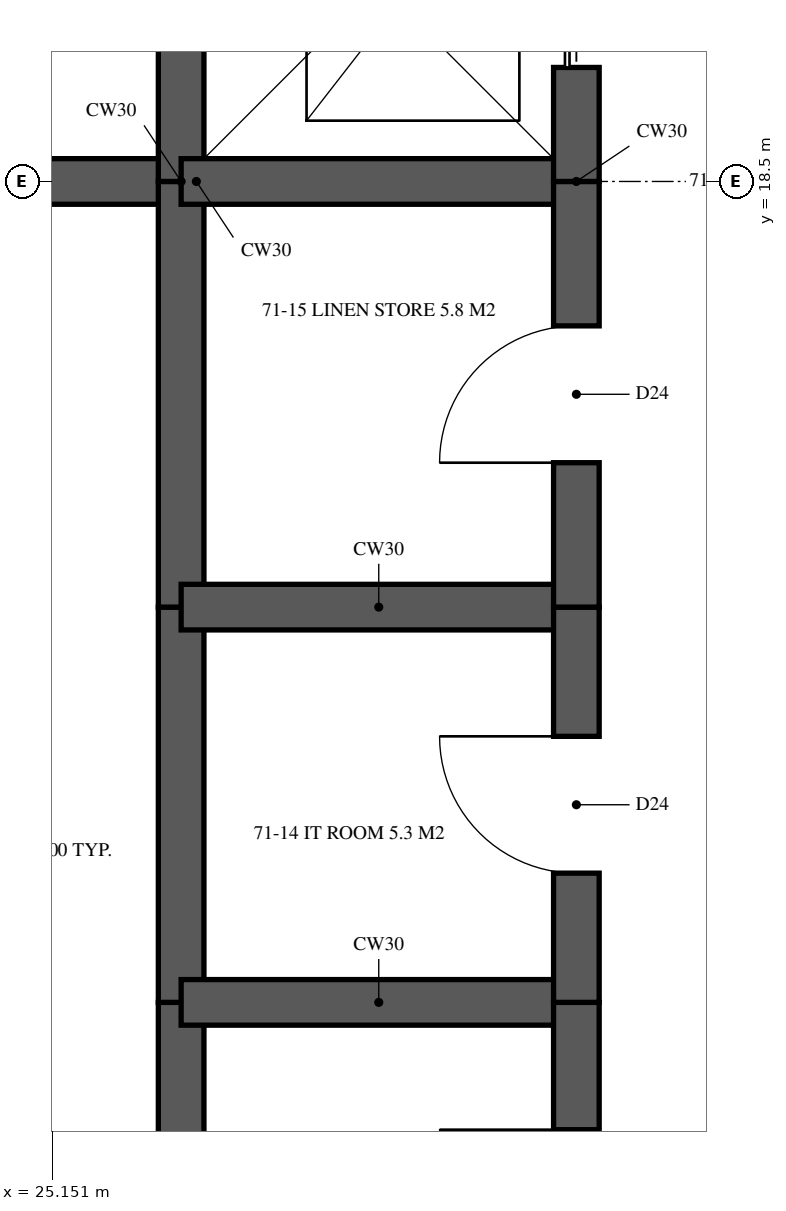
"""IFC4 building model, lengths in metres.
Left out: names, types, materials, properties, quantities, classifications, styles, units other than length and angle.
Written with IfcOpenShell. Run it as: python <this file> out.ifc"""

import sys

from ifc_helpers import new_model, si_unit, direction, frame, frame_2d, origin, place, context, subcontext, project, spatial, rectangle, extrude, element, fill, save


model = new_model("IFC4")
c1 = context("Model", 3, precision=1e-05, world=origin(), true_north=direction((0.0, 1.0)))
c2 = subcontext(c1, "Body", "Model", "MODEL_VIEW")
j1 = project(units=[si_unit("LENGTHUNIT", "METRE"), si_unit("PLANEANGLEUNIT", "RADIAN")], contexts=[c1])
p1 = place(None, origin())
s1 = spatial("IfcSite", under=j1, at=p1, CompositionType="ELEMENT")
p2 = place(p1, origin())
s2 = spatial("IfcBuilding", under=s1, at=p2, CompositionType="ELEMENT")
p3 = place(p2, frame((0.0, 0.0, 259.95)))
s3 = spatial("IfcBuildingStorey", under=s2, at=p3, CompositionType="ELEMENT", Elevation=259.95)
p4 = place(p3, frame((26.0, 10.675, 0.0), z_axis=(0.0, 0.0, 1.0), x_axis=(0.0, 1.0, 0.0)))
e1 = element("IfcWall", 1, at=p4, inside=s3, PredefinedType="SHEAR", context=c2, shape_type="SweptSolid", body=[
    extrude(rectangle(XDim=2.425, YDim=0.3, at=frame_2d((1.212, 0.0))), origin(), (0.0, 0.0, 1.0), 3.9),
])
p5 = place(p3, frame((26.0, 13.1, 0.0), z_axis=(0.0, 0.0, 1.0), x_axis=(0.0, 1.0, 0.0)))
e2 = element("IfcWall", 2, at=p5, inside=s3, PredefinedType="SHEAR", context=c2, shape_type="SweptSolid", body=[
    extrude(rectangle(XDim=2.6, YDim=0.3, at=frame_2d((1.3, 0.0))), origin(), (0.0, 0.0, 1.0), 3.9),
])
p6 = place(p3, frame((26.0, 15.7, 0.0), z_axis=(0.0, 0.0, 1.0), x_axis=(0.0, 1.0, 0.0)))
e3 = element("IfcWall", 3, at=p6, inside=s3, PredefinedType="SHEAR", context=c2, shape_type="SweptSolid", body=[
    extrude(rectangle(XDim=2.8, YDim=0.3, at=frame_2d((1.4, 0.0))), origin(), (0.0, 0.0, 1.0), 3.9),
])
p7 = place(p3, frame((26.0, 18.5, 0.0), z_axis=(0.0, 0.0, 1.0), x_axis=(0.0, 1.0, 0.0)))
e4 = element("IfcWall", 4, at=p7, inside=s3, PredefinedType="SHEAR", context=c2, shape_type="SweptSolid", body=[
    extrude(rectangle(XDim=2.6, YDim=0.3, at=frame_2d((1.3, 0.0))), origin(), (0.0, 0.0, 1.0), 3.9),
])
p8 = place(p3, frame((28.6, 10.675, 0.0), z_axis=(0.0, 0.0, 1.0), x_axis=(0.0, 1.0, 0.0)))
e5 = element("IfcWall", 5, at=p8, inside=s3, PredefinedType="SHEAR", context=c2, shape_type="SweptSolid", body=[
    extrude(rectangle(XDim=2.425, YDim=0.3, at=frame_2d((1.212, 0.0))), origin(), (0.0, 0.0, 1.0), 3.9),
])
p9 = place(p8, frame((0.688, 0.0, 0.0)))
e6 = element("IfcOpeningElement", 6, at=p9, cuts=e5, PredefinedType="OPENING", context=c2, shape_type="SweptSolid", body=[
    extrude(rectangle(XDim=0.9, YDim=2.1, at=frame_2d((0.45, 1.05))), frame((0.0, 0.16, 0.0), z_axis=(0.0, -1.0, 0.0), x_axis=(1.0, 0.0, 0.0)), (0.0, 0.0, 1.0), 0.32),
])
p10 = place(p3, frame((28.6, 13.1, 0.0), z_axis=(0.0, 0.0, 1.0), x_axis=(0.0, 1.0, 0.0)))
e7 = element("IfcWall", 7, at=p10, inside=s3, PredefinedType="SHEAR", context=c2, shape_type="SweptSolid", body=[
    extrude(rectangle(XDim=2.6, YDim=0.3, at=frame_2d((1.3, 0.0))), origin(), (0.0, 0.0, 1.0), 3.9),
])
p11 = place(p10, frame((0.85, 0.0, 0.0)))
e8 = element("IfcOpeningElement", 8, at=p11, cuts=e7, PredefinedType="OPENING", context=c2, shape_type="SweptSolid", body=[
    extrude(rectangle(XDim=0.9, YDim=2.1, at=frame_2d((0.45, 1.05))), frame((0.0, 0.16, 0.0), z_axis=(0.0, -1.0, 0.0), x_axis=(1.0, 0.0, 0.0)), (0.0, 0.0, 1.0), 0.32),
])
p12 = place(p3, frame((28.6, 15.7, 0.0), z_axis=(0.0, 0.0, 1.0), x_axis=(0.0, 1.0, 0.0)))
e9 = element("IfcWall", 9, at=p12, inside=s3, PredefinedType="SHEAR", context=c2, shape_type="SweptSolid", body=[
    extrude(rectangle(XDim=2.8, YDim=0.3, at=frame_2d((1.4, 0.0))), origin(), (0.0, 0.0, 1.0), 3.9),
])
p13 = place(p12, frame((0.95, 0.0, 0.0)))
e10 = element("IfcOpeningElement", 10, at=p13, cuts=e9, PredefinedType="OPENING", context=c2, shape_type="SweptSolid", body=[
    extrude(rectangle(XDim=0.9, YDim=2.1, at=frame_2d((0.45, 1.05))), frame((0.0, 0.16, 0.0), z_axis=(0.0, -1.0, 0.0), x_axis=(1.0, 0.0, 0.0)), (0.0, 0.0, 1.0), 0.32),
])
p14 = place(p3, frame((28.6, 18.5, 0.0), z_axis=(0.0, 0.0, 1.0), x_axis=(0.0, 1.0, 0.0)))
e11 = element("IfcWall", 11, at=p14, inside=s3, PredefinedType="SHEAR", context=c2, shape_type="SweptSolid", body=[
    extrude(rectangle(XDim=2.6, YDim=0.3, at=frame_2d((1.3, 0.0))), origin(), (0.0, 0.0, 1.0), 3.9),
])
p15 = place(p14, frame((0.75, 0.0, 0.0)))
e12 = element("IfcOpeningElement", 12, at=p15, cuts=e11, PredefinedType="OPENING", context=c2, shape_type="SweptSolid", body=[
    extrude(rectangle(XDim=1.1, YDim=2.1, at=frame_2d((0.55, 1.05))), frame((0.0, 0.16, 0.0), z_axis=(0.0, -1.0, 0.0), x_axis=(1.0, 0.0, 0.0)), (0.0, 0.0, 1.0), 0.32),
])
p16 = place(p3, frame((23.6, 18.5, 0.0), z_axis=(0.0, 0.0, 1.0), x_axis=(1.0, 0.0, 0.0)))
e13 = element("IfcWall", 13, at=p16, inside=s3, PredefinedType="SHEAR", context=c2, shape_type="SweptSolid", body=[
    extrude(rectangle(XDim=2.4, YDim=0.3, at=frame_2d((1.2, 0.0))), origin(), (0.0, 0.0, 1.0), 3.9),
])
for number, where, z_axis, x_axis in (
    (14, (26.0, 13.1, 0.0), (0.0, 0.0, 1.0), (1.0, 0.0, 0.0)),
    (15, (26.0, 15.7, 0.0), (0.0, 0.0, 1.0), (1.0, 0.0, 0.0)),
    (16, (26.0, 18.5, 0.0), (0.0, 0.0, 1.0), (1.0, 0.0, 0.0)),
):
    element("IfcWall", number, at=place(p3, frame(where, z_axis=z_axis, x_axis=x_axis)), inside=s3, PredefinedType="SHEAR", context=c2, shape_type="SweptSolid", body=[
        extrude(rectangle(XDim=2.6, YDim=0.3, at=frame_2d((1.3, 0.0))), origin(), (0.0, 0.0, 1.0), 3.9),
    ])
p17 = place(p15, origin())
e17 = element("IfcDoor", 17, at=p17, inside=s3, OperationType="SLIDING_TO_LEFT", PredefinedType="DOOR", context=c2, shape_type="SweptSolid", body=[
    extrude(rectangle(XDim=1.1, YDim=2.1, at=frame_2d((0.55, 1.05))), frame((0.0, 0.025, 0.0), z_axis=(0.0, -1.0, 0.0), x_axis=(1.0, 0.0, 0.0)), (0.0, 0.0, 1.0), 0.05),
])
fill(e12, e17)
p18 = place(p9, origin())
e18 = element("IfcDoor", 18, at=p18, inside=s3, OperationType="SINGLE_SWING_RIGHT", PredefinedType="DOOR", context=c2, shape_type="SweptSolid", body=[
    extrude(rectangle(XDim=0.9, YDim=2.1, at=frame_2d((0.45, 1.05))), frame((0.0, 0.025, 0.0), z_axis=(0.0, -1.0, 0.0), x_axis=(1.0, 0.0, 0.0)), (0.0, 0.0, 1.0), 0.05),
])
fill(e6, e18)
p19 = place(p11, origin())
e19 = element("IfcDoor", 19, at=p19, inside=s3, OperationType="SINGLE_SWING_RIGHT", PredefinedType="DOOR", context=c2, shape_type="SweptSolid", body=[
    extrude(rectangle(XDim=0.9, YDim=2.1, at=frame_2d((0.45, 1.05))), frame((0.0, 0.025, 0.0), z_axis=(0.0, -1.0, 0.0), x_axis=(1.0, 0.0, 0.0)), (0.0, 0.0, 1.0), 0.05),
])
fill(e8, e19)
p20 = place(p13, origin())
e20 = element("IfcDoor", 20, at=p20, inside=s3, OperationType="SINGLE_SWING_LEFT", PredefinedType="DOOR", context=c2, shape_type="SweptSolid", body=[
    extrude(rectangle(XDim=0.9, YDim=2.1, at=frame_2d((0.45, 1.05))), frame((0.0, 0.025, 0.0), z_axis=(0.0, -1.0, 0.0), x_axis=(1.0, 0.0, 0.0)), (0.0, 0.0, 1.0), 0.05),
])
fill(e10, e20)
save(model, sys.argv[1])
